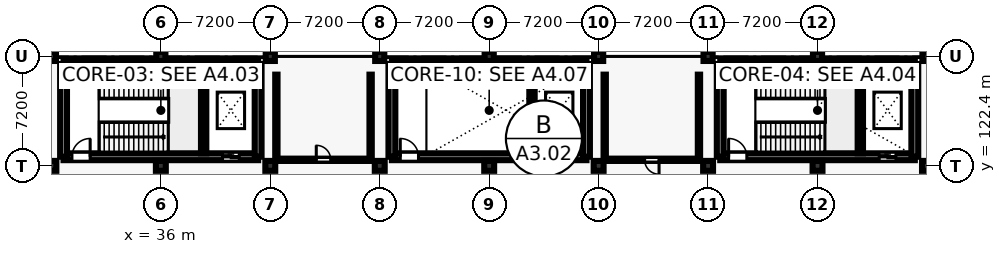
"""IFC4 building model, lengths in metres.
Left out: names, types, materials, properties, quantities, classifications, styles, units other than length and angle.
Written with IfcOpenShell. Run it as: python <this file> out.ifc"""

import sys

from ifc_helpers import new_model, si_unit, direction, frame, frame_2d, origin, origin_2d, place, context, subcontext, project, spatial, rectangle, extrude, element, fill, save


model = new_model("IFC4")
c1 = context("Model", 3, precision=1e-05, world=origin(), true_north=direction((0.0, 1.0)))
c2 = subcontext(c1, "Body", "Model", "MODEL_VIEW")
j1 = project(units=[si_unit("LENGTHUNIT", "METRE"), si_unit("PLANEANGLEUNIT", "RADIAN")], contexts=[c1])
p1 = place(None, origin())
s1 = spatial("IfcSite", under=j1, at=p1, CompositionType="ELEMENT")
p2 = place(p1, origin())
s2 = spatial("IfcBuilding", under=s1, at=p2, CompositionType="ELEMENT")
p3 = place(p2, frame((0.0, 0.0, 13.8)))
s3 = spatial("IfcBuildingStorey", under=s2, at=p3, CompositionType="ELEMENT", Elevation=13.8)
p4 = place(p3, frame((28.8, 122.4, 0.0), z_axis=(0.0, 0.0, 1.0), x_axis=(1.0, 0.0, 0.0)))
e1 = element("IfcColumn", 1, at=p4, inside=s3, PredefinedType="COLUMN", context=c2, shape_type="SweptSolid", body=[
    extrude(rectangle(XDim=0.65, YDim=0.65, at=origin_2d()), origin(), (0.0, 0.0, 1.0), 4.8),
])
p5 = place(p3, frame((28.8, 129.6, 0.0), z_axis=(0.0, 0.0, 1.0), x_axis=(1.0, 0.0, 0.0)))
e2 = element("IfcColumn", 2, at=p5, inside=s3, PredefinedType="COLUMN", context=c2, shape_type="SweptSolid", body=[
    extrude(rectangle(XDim=0.6, YDim=0.6, at=origin_2d()), origin(), (0.0, 0.0, 1.0), 4.8),
])
p6 = place(p3, frame((36.0, 122.4, 0.0), z_axis=(0.0, 0.0, 1.0), x_axis=(1.0, 0.0, 0.0)))
e3 = element("IfcColumn", 3, at=p6, inside=s3, PredefinedType="COLUMN", context=c2, shape_type="SweptSolid", body=[
    extrude(rectangle(XDim=0.65, YDim=0.65, at=origin_2d()), origin(), (0.0, 0.0, 1.0), 4.8),
])
p7 = place(p3, frame((36.0, 129.6, 0.0), z_axis=(0.0, 0.0, 1.0), x_axis=(1.0, 0.0, 0.0)))
e4 = element("IfcColumn", 4, at=p7, inside=s3, PredefinedType="COLUMN", context=c2, shape_type="SweptSolid", body=[
    extrude(rectangle(XDim=0.6, YDim=0.6, at=origin_2d()), origin(), (0.0, 0.0, 1.0), 4.8),
])
p8 = place(p3, frame((43.2, 122.4, 0.0), z_axis=(0.0, 0.0, 1.0), x_axis=(1.0, 0.0, 0.0)))
e5 = element("IfcColumn", 5, at=p8, inside=s3, PredefinedType="COLUMN", context=c2, shape_type="SweptSolid", body=[
    extrude(rectangle(XDim=0.65, YDim=0.65, at=origin_2d()), origin(), (0.0, 0.0, 1.0), 4.8),
])
p9 = place(p3, frame((43.2, 129.6, 0.0), z_axis=(0.0, 0.0, 1.0), x_axis=(1.0, 0.0, 0.0)))
e6 = element("IfcColumn", 6, at=p9, inside=s3, PredefinedType="COLUMN", context=c2, shape_type="SweptSolid", body=[
    extrude(rectangle(XDim=0.6, YDim=0.6, at=origin_2d()), origin(), (0.0, 0.0, 1.0), 4.8),
])
p10 = place(p3, frame((50.4, 122.4, 0.0), z_axis=(0.0, 0.0, 1.0), x_axis=(1.0, 0.0, 0.0)))
e7 = element("IfcColumn", 7, at=p10, inside=s3, PredefinedType="COLUMN", context=c2, shape_type="SweptSolid", body=[
    extrude(rectangle(XDim=0.65, YDim=0.65, at=origin_2d()), origin(), (0.0, 0.0, 1.0), 4.8),
])
p11 = place(p3, frame((50.4, 129.6, 0.0), z_axis=(0.0, 0.0, 1.0), x_axis=(1.0, 0.0, 0.0)))
e8 = element("IfcColumn", 8, at=p11, inside=s3, PredefinedType="COLUMN", context=c2, shape_type="SweptSolid", body=[
    extrude(rectangle(XDim=0.6, YDim=0.6, at=origin_2d()), origin(), (0.0, 0.0, 1.0), 4.8),
])
p12 = place(p3, frame((57.6, 122.4, 0.0), z_axis=(0.0, 0.0, 1.0), x_axis=(1.0, 0.0, 0.0)))
e9 = element("IfcColumn", 9, at=p12, inside=s3, PredefinedType="COLUMN", context=c2, shape_type="SweptSolid", body=[
    extrude(rectangle(XDim=0.65, YDim=0.65, at=origin_2d()), origin(), (0.0, 0.0, 1.0), 4.8),
])
p13 = place(p3, frame((57.6, 129.6, 0.0), z_axis=(0.0, 0.0, 1.0), x_axis=(1.0, 0.0, 0.0)))
e10 = element("IfcColumn", 10, at=p13, inside=s3, PredefinedType="COLUMN", context=c2, shape_type="SweptSolid", body=[
    extrude(rectangle(XDim=0.6, YDim=0.6, at=origin_2d()), origin(), (0.0, 0.0, 1.0), 4.8),
])
p14 = place(p3, frame((64.8, 122.4, 0.0), z_axis=(0.0, 0.0, 1.0), x_axis=(1.0, 0.0, 0.0)))
e11 = element("IfcColumn", 11, at=p14, inside=s3, PredefinedType="COLUMN", context=c2, shape_type="SweptSolid", body=[
    extrude(rectangle(XDim=0.65, YDim=0.65, at=origin_2d()), origin(), (0.0, 0.0, 1.0), 4.8),
])
p15 = place(p3, frame((64.8, 129.6, 0.0), z_axis=(0.0, 0.0, 1.0), x_axis=(1.0, 0.0, 0.0)))
e12 = element("IfcColumn", 12, at=p15, inside=s3, PredefinedType="COLUMN", context=c2, shape_type="SweptSolid", body=[
    extrude(rectangle(XDim=0.6, YDim=0.6, at=origin_2d()), origin(), (0.0, 0.0, 1.0), 4.8),
])
p16 = place(p3, frame((72.0, 122.4, 0.0), z_axis=(0.0, 0.0, 1.0), x_axis=(1.0, 0.0, 0.0)))
e13 = element("IfcColumn", 13, at=p16, inside=s3, PredefinedType="COLUMN", context=c2, shape_type="SweptSolid", body=[
    extrude(rectangle(XDim=0.65, YDim=0.65, at=origin_2d()), origin(), (0.0, 0.0, 1.0), 4.8),
])
p17 = place(p3, frame((72.0, 129.6, 0.0), z_axis=(0.0, 0.0, 1.0), x_axis=(1.0, 0.0, 0.0)))
e14 = element("IfcColumn", 14, at=p17, inside=s3, PredefinedType="COLUMN", context=c2, shape_type="SweptSolid", body=[
    extrude(rectangle(XDim=0.6, YDim=0.6, at=origin_2d()), origin(), (0.0, 0.0, 1.0), 4.8),
])
p18 = place(p3, frame((79.2, 122.4, 0.0), z_axis=(0.0, 0.0, 1.0), x_axis=(1.0, 0.0, 0.0)))
e15 = element("IfcColumn", 15, at=p18, inside=s3, PredefinedType="COLUMN", context=c2, shape_type="SweptSolid", body=[
    extrude(rectangle(XDim=0.65, YDim=0.65, at=origin_2d()), origin(), (0.0, 0.0, 1.0), 4.8),
])
p19 = place(p3, frame((79.2, 129.6, 0.0), z_axis=(0.0, 0.0, 1.0), x_axis=(1.0, 0.0, 0.0)))
e16 = element("IfcColumn", 16, at=p19, inside=s3, PredefinedType="COLUMN", context=c2, shape_type="SweptSolid", body=[
    extrude(rectangle(XDim=0.6, YDim=0.6, at=origin_2d()), origin(), (0.0, 0.0, 1.0), 4.8),
])
p20 = place(p3, frame((86.4, 122.4, 0.0), z_axis=(0.0, 0.0, 1.0), x_axis=(1.0, 0.0, 0.0)))
e17 = element("IfcColumn", 17, at=p20, inside=s3, PredefinedType="COLUMN", context=c2, shape_type="SweptSolid", body=[
    extrude(rectangle(XDim=0.65, YDim=0.65, at=origin_2d()), origin(), (0.0, 0.0, 1.0), 4.8),
])
p21 = place(p3, frame((86.4, 129.6, 0.0), z_axis=(0.0, 0.0, 1.0), x_axis=(1.0, 0.0, 0.0)))
e18 = element("IfcColumn", 18, at=p21, inside=s3, PredefinedType="COLUMN", context=c2, shape_type="SweptSolid", body=[
    extrude(rectangle(XDim=0.6, YDim=0.6, at=origin_2d()), origin(), (0.0, 0.0, 1.0), 4.8),
])
p22 = place(p3, frame((29.6, 123.0, 0.0), z_axis=(0.0, 0.0, 1.0), x_axis=(1.0, 0.0, 0.0)))
e19 = element("IfcWall", 19, at=p22, inside=s3, PredefinedType="SHEAR", context=c2, shape_type="SweptSolid", body=[
    extrude(rectangle(XDim=12.8, YDim=0.45, at=frame_2d((6.4, 0.0))), origin(), (0.0, 0.0, 1.0), 4.53),
])
p23 = place(p22, frame((0.55, 0.0, 0.0)))
e20 = element("IfcOpeningElement", 20, at=p23, cuts=e19, PredefinedType="OPENING", context=c2, shape_type="SweptSolid", body=[
    extrude(rectangle(XDim=1.2, YDim=2.25, at=frame_2d((0.6, 1.125))), frame((0.0, 0.235, 0.0), z_axis=(0.0, -1.0, 0.0), x_axis=(1.0, 0.0, 0.0)), (0.0, 0.0, 1.0), 0.47),
])
p24 = place(p22, frame((10.458, 0.0, 0.0)))
e21 = element("IfcOpeningElement", 21, at=p24, cuts=e19, PredefinedType="OPENING", context=c2, shape_type="SweptSolid", body=[
    extrude(rectangle(XDim=1.1, YDim=2.2, at=frame_2d((0.55, 1.1))), frame((0.0, 0.235, 0.0), z_axis=(0.0, -1.0, 0.0), x_axis=(1.0, 0.0, 0.0)), (0.0, 0.0, 1.0), 0.47),
])
p25 = place(p3, frame((29.6, 129.1, 0.0), z_axis=(0.0, 0.0, 1.0), x_axis=(1.0, 0.0, 0.0)))
e22 = element("IfcWall", 22, at=p25, inside=s3, PredefinedType="SHEAR", context=c2, shape_type="SweptSolid", body=[
    extrude(rectangle(XDim=12.8, YDim=0.45, at=frame_2d((6.4, 0.0))), origin(), (0.0, 0.0, 1.0), 4.53),
])
for number, where, z_axis, x_axis in (
    (23, (29.6, 123.0, 0.0), (0.0, 0.0, 1.0), (0.0, 1.0, 0.0)),
    (24, (42.4, 123.0, 0.0), (0.0, 0.0, 1.0), (0.0, 1.0, 0.0)),
):
    element("IfcWall", number, at=place(p3, frame(where, z_axis=z_axis, x_axis=x_axis)), inside=s3, PredefinedType="SHEAR", context=c2, shape_type="SweptSolid", body=[
        extrude(rectangle(XDim=6.1, YDim=0.45, at=frame_2d((3.05, 0.0))), origin(), (0.0, 0.0, 1.0), 4.53),
    ])
p26 = place(p3, frame((38.816, 123.225, 0.0), z_axis=(0.0, 0.0, 1.0), x_axis=(0.0, 1.0, 0.0)))
e25 = element("IfcWall", 25, at=p26, inside=s3, PredefinedType="SHEAR", context=c2, shape_type="SweptSolid", body=[
    extrude(rectangle(XDim=5.65, YDim=0.35, at=frame_2d((2.825, 0.0))), origin(), (0.0, 0.0, 1.0), 4.53),
])
p27 = place(p3, frame((72.8, 123.0, 0.0), z_axis=(0.0, 0.0, 1.0), x_axis=(1.0, 0.0, 0.0)))
e26 = element("IfcWall", 26, at=p27, inside=s3, PredefinedType="SHEAR", context=c2, shape_type="SweptSolid", body=[
    extrude(rectangle(XDim=12.8, YDim=0.45, at=frame_2d((6.4, 0.0))), origin(), (0.0, 0.0, 1.0), 4.53),
])
p28 = place(p27, frame((0.55, 0.0, 0.0)))
e27 = element("IfcOpeningElement", 27, at=p28, cuts=e26, PredefinedType="OPENING", context=c2, shape_type="SweptSolid", body=[
    extrude(rectangle(XDim=1.2, YDim=2.25, at=frame_2d((0.6, 1.125))), frame((0.0, 0.235, 0.0), z_axis=(0.0, -1.0, 0.0), x_axis=(1.0, 0.0, 0.0)), (0.0, 0.0, 1.0), 0.47),
])
p29 = place(p27, frame((10.458, 0.0, 0.0)))
e28 = element("IfcOpeningElement", 28, at=p29, cuts=e26, PredefinedType="OPENING", context=c2, shape_type="SweptSolid", body=[
    extrude(rectangle(XDim=1.1, YDim=2.2, at=frame_2d((0.55, 1.1))), frame((0.0, 0.235, 0.0), z_axis=(0.0, -1.0, 0.0), x_axis=(1.0, 0.0, 0.0)), (0.0, 0.0, 1.0), 0.47),
])
p30 = place(p3, frame((72.8, 129.1, 0.0), z_axis=(0.0, 0.0, 1.0), x_axis=(1.0, 0.0, 0.0)))
e29 = element("IfcWall", 29, at=p30, inside=s3, PredefinedType="SHEAR", context=c2, shape_type="SweptSolid", body=[
    extrude(rectangle(XDim=12.8, YDim=0.45, at=frame_2d((6.4, 0.0))), origin(), (0.0, 0.0, 1.0), 4.53),
])
for number, where, z_axis, x_axis in (
    (30, (72.8, 123.0, 0.0), (0.0, 0.0, 1.0), (0.0, 1.0, 0.0)),
    (31, (85.6, 123.0, 0.0), (0.0, 0.0, 1.0), (0.0, 1.0, 0.0)),
):
    element("IfcWall", number, at=place(p3, frame(where, z_axis=z_axis, x_axis=x_axis)), inside=s3, PredefinedType="SHEAR", context=c2, shape_type="SweptSolid", body=[
        extrude(rectangle(XDim=6.1, YDim=0.45, at=frame_2d((3.05, 0.0))), origin(), (0.0, 0.0, 1.0), 4.53),
    ])
p31 = place(p3, frame((82.016, 123.225, 0.0), z_axis=(0.0, 0.0, 1.0), x_axis=(0.0, 1.0, 0.0)))
e32 = element("IfcWall", 32, at=p31, inside=s3, PredefinedType="SHEAR", context=c2, shape_type="SweptSolid", body=[
    extrude(rectangle(XDim=5.65, YDim=0.35, at=frame_2d((2.825, 0.0))), origin(), (0.0, 0.0, 1.0), 4.53),
])
p32 = place(p3, frame((51.2, 123.0, 0.0), z_axis=(0.0, 0.0, 1.0), x_axis=(1.0, 0.0, 0.0)))
e33 = element("IfcWall", 33, at=p32, inside=s3, PredefinedType="SHEAR", context=c2, shape_type="SweptSolid", body=[
    extrude(rectangle(XDim=12.8, YDim=0.45, at=frame_2d((6.4, 0.0))), origin(), (0.0, 0.0, 1.0), 4.53),
])
p33 = place(p32, frame((0.55, 0.0, 0.0)))
e34 = element("IfcOpeningElement", 34, at=p33, cuts=e33, PredefinedType="OPENING", context=c2, shape_type="SweptSolid", body=[
    extrude(rectangle(XDim=1.2, YDim=2.25, at=frame_2d((0.6, 1.125))), frame((0.0, 0.235, 0.0), z_axis=(0.0, -1.0, 0.0), x_axis=(1.0, 0.0, 0.0)), (0.0, 0.0, 1.0), 0.47),
])
p34 = place(p32, frame((10.458, 0.0, 0.0)))
e35 = element("IfcOpeningElement", 35, at=p34, cuts=e33, PredefinedType="OPENING", context=c2, shape_type="SweptSolid", body=[
    extrude(rectangle(XDim=1.1, YDim=2.2, at=frame_2d((0.55, 1.1))), frame((0.0, 0.235, 0.0), z_axis=(0.0, -1.0, 0.0), x_axis=(1.0, 0.0, 0.0)), (0.0, 0.0, 1.0), 0.47),
])
p35 = place(p3, frame((51.2, 129.1, 0.0), z_axis=(0.0, 0.0, 1.0), x_axis=(1.0, 0.0, 0.0)))
e36 = element("IfcWall", 36, at=p35, inside=s3, PredefinedType="SHEAR", context=c2, shape_type="SweptSolid", body=[
    extrude(rectangle(XDim=12.8, YDim=0.45, at=frame_2d((6.4, 0.0))), origin(), (0.0, 0.0, 1.0), 4.53),
])
for number, where, z_axis, x_axis in (
    (37, (51.2, 123.0, 0.0), (0.0, 0.0, 1.0), (0.0, 1.0, 0.0)),
    (38, (64.0, 123.0, 0.0), (0.0, 0.0, 1.0), (0.0, 1.0, 0.0)),
):
    element("IfcWall", number, at=place(p3, frame(where, z_axis=z_axis, x_axis=x_axis)), inside=s3, PredefinedType="SHEAR", context=c2, shape_type="SweptSolid", body=[
        extrude(rectangle(XDim=6.1, YDim=0.45, at=frame_2d((3.05, 0.0))), origin(), (0.0, 0.0, 1.0), 4.53),
    ])
p36 = place(p3, frame((60.416, 123.225, 0.0), z_axis=(0.0, 0.0, 1.0), x_axis=(0.0, 1.0, 0.0)))
e39 = element("IfcWall", 39, at=p36, inside=s3, PredefinedType="SHEAR", context=c2, shape_type="SweptSolid", body=[
    extrude(rectangle(XDim=5.65, YDim=0.35, at=frame_2d((2.825, 0.0))), origin(), (0.0, 0.0, 1.0), 4.53),
])
p37 = place(p3, frame((43.6, 122.8, 0.0), z_axis=(0.0, 0.0, 1.0), x_axis=(1.0, 0.0, 0.0)))
e40 = element("IfcWall", 40, at=p37, inside=s3, PredefinedType="PARTITIONING", context=c2, shape_type="SweptSolid", body=[
    extrude(rectangle(XDim=6.2, YDim=0.15, at=frame_2d((3.1, 0.0))), origin(), (0.0, 0.0, 1.0), 3.59),
])
p38 = place(p37, frame((2.625, 0.0, 0.0)))
e41 = element("IfcOpeningElement", 41, at=p38, cuts=e40, PredefinedType="OPENING", context=c2, shape_type="SweptSolid", body=[
    extrude(rectangle(XDim=0.95, YDim=2.15, at=frame_2d((0.475, 1.075))), frame((0.0, 0.085, 0.0), z_axis=(0.0, -1.0, 0.0), x_axis=(1.0, 0.0, 0.0)), (0.0, 0.0, 1.0), 0.17),
])
for number, where, z_axis, x_axis in (
    (42, (49.8, 122.8, 0.0), (0.0, 0.0, 1.0), (0.0, 1.0, 0.0)),
    (43, (43.6, 128.4, 0.0), (0.0, 0.0, 1.0), (0.0, -1.0, 0.0)),
):
    element("IfcWall", number, at=place(p3, frame(where, z_axis=z_axis, x_axis=x_axis)), inside=s3, PredefinedType="PARTITIONING", context=c2, shape_type="SweptSolid", body=[
        extrude(rectangle(XDim=5.6, YDim=0.15, at=frame_2d((2.8, 0.0))), origin(), (0.0, 0.0, 1.0), 3.59),
    ])
p39 = place(p3, frame((65.2, 122.8, 0.0), z_axis=(0.0, 0.0, 1.0), x_axis=(1.0, 0.0, 0.0)))
e44 = element("IfcWall", 44, at=p39, inside=s3, PredefinedType="PARTITIONING", context=c2, shape_type="SweptSolid", body=[
    extrude(rectangle(XDim=6.2, YDim=0.15, at=frame_2d((3.1, 0.0))), origin(), (0.0, 0.0, 1.0), 3.59),
])
p40 = place(p39, frame((2.625, 0.0, 0.0)))
e45 = element("IfcOpeningElement", 45, at=p40, cuts=e44, PredefinedType="OPENING", context=c2, shape_type="SweptSolid", body=[
    extrude(rectangle(XDim=0.95, YDim=2.15, at=frame_2d((0.475, 1.075))), frame((0.0, 0.085, 0.0), z_axis=(0.0, -1.0, 0.0), x_axis=(1.0, 0.0, 0.0)), (0.0, 0.0, 1.0), 0.17),
])
for number, where, z_axis, x_axis in (
    (46, (71.4, 122.8, 0.0), (0.0, 0.0, 1.0), (0.0, 1.0, 0.0)),
    (47, (65.2, 128.4, 0.0), (0.0, 0.0, 1.0), (0.0, -1.0, 0.0)),
):
    element("IfcWall", number, at=place(p3, frame(where, z_axis=z_axis, x_axis=x_axis)), inside=s3, PredefinedType="PARTITIONING", context=c2, shape_type="SweptSolid", body=[
        extrude(rectangle(XDim=5.6, YDim=0.15, at=frame_2d((2.8, 0.0))), origin(), (0.0, 0.0, 1.0), 3.59),
    ])
p41 = place(p23, origin())
e48 = element("IfcDoor", 48, at=p41, inside=s3, OperationType="SINGLE_SWING_RIGHT", PredefinedType="DOOR", context=c2, shape_type="SweptSolid", body=[
    extrude(rectangle(XDim=1.2, YDim=2.25, at=frame_2d((0.6, 1.125))), frame((0.0, 0.025, 0.0), z_axis=(0.0, -1.0, 0.0), x_axis=(1.0, 0.0, 0.0)), (0.0, 0.0, 1.0), 0.05),
])
fill(e20, e48)
p42 = place(p24, origin())
e49 = element("IfcDoor", 49, at=p42, inside=s3, OperationType="SLIDING_TO_LEFT", PredefinedType="DOOR", context=c2, shape_type="SweptSolid", body=[
    extrude(rectangle(XDim=1.1, YDim=2.2, at=frame_2d((0.55, 1.1))), frame((0.0, 0.025, 0.0), z_axis=(0.0, -1.0, 0.0), x_axis=(1.0, 0.0, 0.0)), (0.0, 0.0, 1.0), 0.05),
])
fill(e21, e49)
p43 = place(p28, origin())
e50 = element("IfcDoor", 50, at=p43, inside=s3, OperationType="SINGLE_SWING_LEFT", PredefinedType="DOOR", context=c2, shape_type="SweptSolid", body=[
    extrude(rectangle(XDim=1.2, YDim=2.25, at=frame_2d((0.6, 1.125))), frame((0.0, 0.025, 0.0), z_axis=(0.0, -1.0, 0.0), x_axis=(1.0, 0.0, 0.0)), (0.0, 0.0, 1.0), 0.05),
])
fill(e27, e50)
p44 = place(p29, origin())
e51 = element("IfcDoor", 51, at=p44, inside=s3, OperationType="SLIDING_TO_LEFT", PredefinedType="DOOR", context=c2, shape_type="SweptSolid", body=[
    extrude(rectangle(XDim=1.1, YDim=2.2, at=frame_2d((0.55, 1.1))), frame((0.0, 0.025, 0.0), z_axis=(0.0, -1.0, 0.0), x_axis=(1.0, 0.0, 0.0)), (0.0, 0.0, 1.0), 0.05),
])
fill(e28, e51)
p45 = place(p33, origin())
e52 = element("IfcDoor", 52, at=p45, inside=s3, OperationType="SINGLE_SWING_LEFT", PredefinedType="DOOR", context=c2, shape_type="SweptSolid", body=[
    extrude(rectangle(XDim=1.2, YDim=2.25, at=frame_2d((0.6, 1.125))), frame((0.0, 0.025, 0.0), z_axis=(0.0, -1.0, 0.0), x_axis=(1.0, 0.0, 0.0)), (0.0, 0.0, 1.0), 0.05),
])
fill(e34, e52)
p46 = place(p34, origin())
e53 = element("IfcDoor", 53, at=p46, inside=s3, OperationType="SLIDING_TO_RIGHT", PredefinedType="DOOR", context=c2, shape_type="SweptSolid", body=[
    extrude(rectangle(XDim=1.1, YDim=2.2, at=frame_2d((0.55, 1.1))), frame((0.0, 0.025, 0.0), z_axis=(0.0, -1.0, 0.0), x_axis=(1.0, 0.0, 0.0)), (0.0, 0.0, 1.0), 0.05),
])
fill(e35, e53)
p47 = place(p38, origin())
e54 = element("IfcDoor", 54, at=p47, inside=s3, OperationType="SINGLE_SWING_LEFT", PredefinedType="DOOR", context=c2, shape_type="SweptSolid", body=[
    extrude(rectangle(XDim=0.95, YDim=2.15, at=frame_2d((0.475, 1.075))), frame((0.0, 0.025, 0.0), z_axis=(0.0, -1.0, 0.0), x_axis=(1.0, 0.0, 0.0)), (0.0, 0.0, 1.0), 0.05),
])
fill(e41, e54)
p48 = place(p40, frame((0.95, 0.0, 0.0), z_axis=(0.0, 0.0, 1.0), x_axis=(-1.0, 0.0, 0.0)))
e55 = element("IfcDoor", 55, at=p48, inside=s3, OperationType="SINGLE_SWING_RIGHT", PredefinedType="DOOR", context=c2, shape_type="SweptSolid", body=[
    extrude(rectangle(XDim=0.95, YDim=2.15, at=frame_2d((0.475, 1.075))), frame((0.0, 0.025, 0.0), z_axis=(0.0, -1.0, 0.0), x_axis=(1.0, 0.0, 0.0)), (0.0, 0.0, 1.0), 0.05),
])
fill(e45, e55)
save(model, sys.argv[1])
